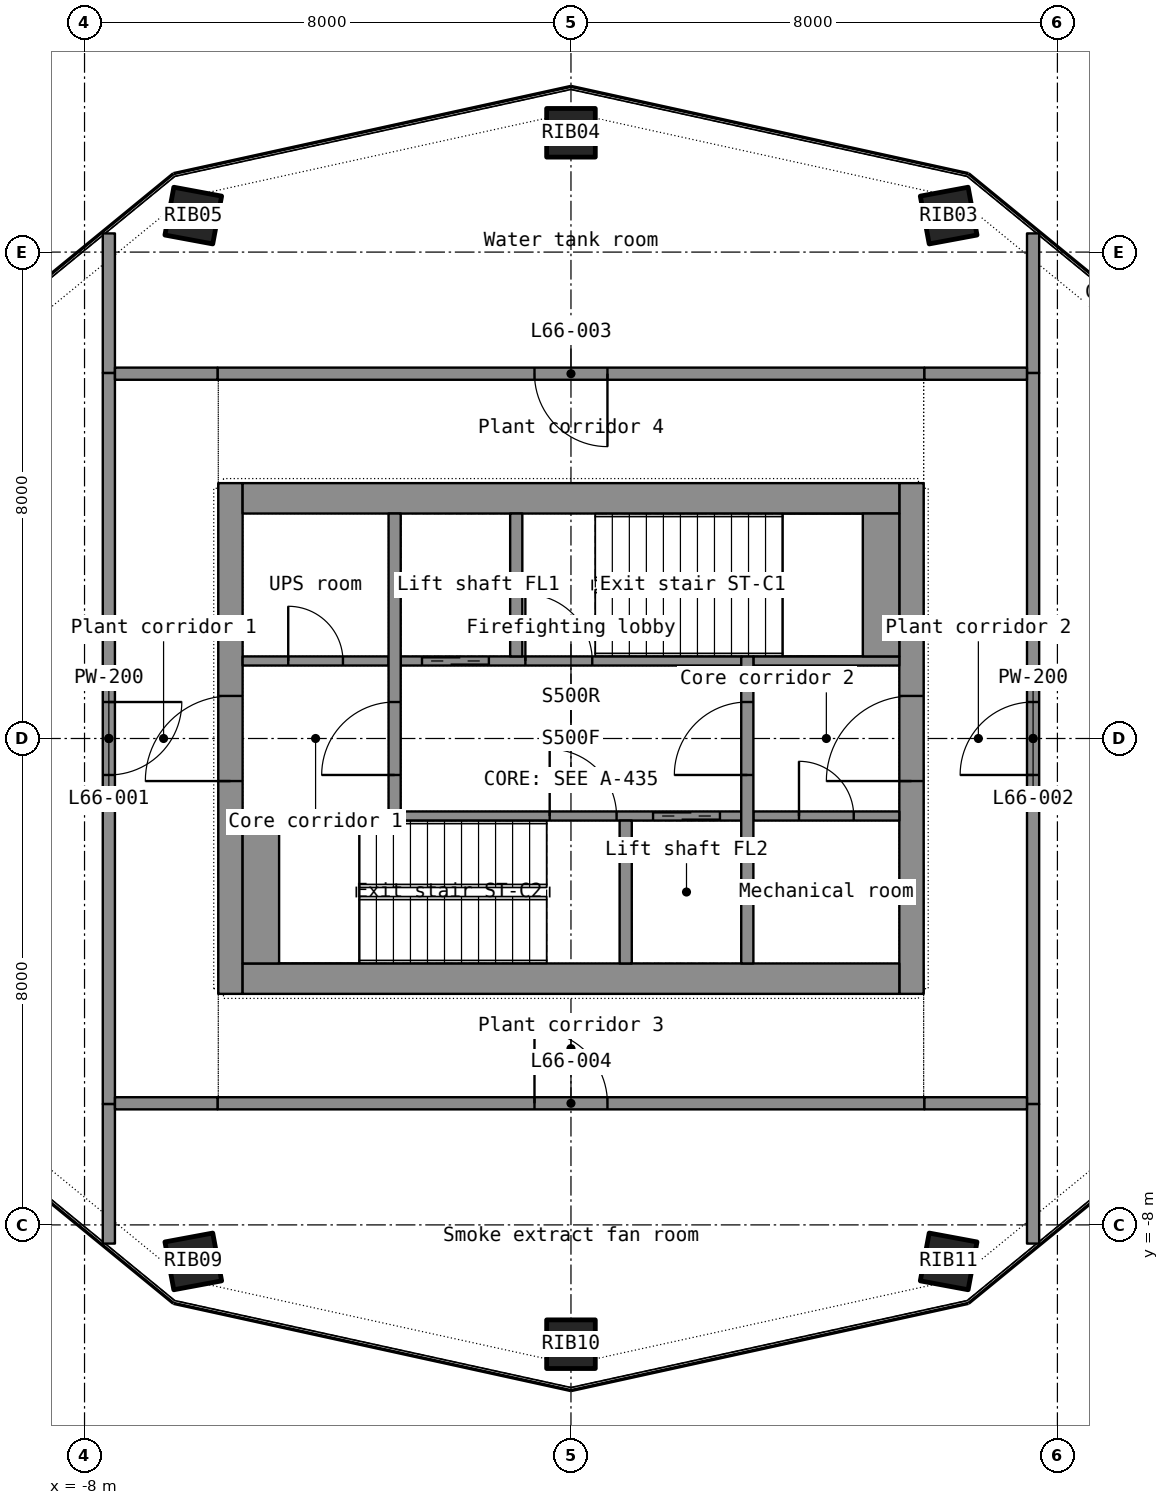
"""IFC4 building model, lengths in metres.
Left out: names, types, materials, properties, quantities, classifications, styles, units other than length and angle.
Written with IfcOpenShell. Run it as: python <this file> out.ifc"""

import sys

from ifc_helpers import new_model, si_unit, direction, frame, frame_2d, origin, origin_2d, place, context, subcontext, project, spatial, rectangle, hollow_rectangle, extrude, element, fill, save


model = new_model("IFC4")
c1 = context("Model", 3, precision=1e-05, world=origin(), true_north=direction((0.0, 1.0)))
c2 = subcontext(c1, "Body", "Model", "MODEL_VIEW")
j1 = project(units=[si_unit("LENGTHUNIT", "METRE"), si_unit("PLANEANGLEUNIT", "RADIAN")], contexts=[c1])
p1 = place(None, origin())
s1 = spatial("IfcSite", under=j1, at=p1, CompositionType="ELEMENT")
p2 = place(p1, origin())
s2 = spatial("IfcBuilding", under=s1, at=p2, CompositionType="ELEMENT")
p3 = place(p2, frame((0.0, 0.0, 272.6)))
s3 = spatial("IfcBuildingStorey", under=s2, at=p3, CompositionType="ELEMENT", Elevation=272.6)
p4 = place(p3, frame((6.211, 8.601, 0.0), z_axis=(-0.06918715, -0.095854973, 0.992987896), x_axis=(0.903382147, -0.428292118, 0.021599968)))
e1 = element("IfcColumn", 1, at=p4, inside=s3, PredefinedType="COLUMN", context=c2, shape_type="SweptSolid", body=[
    extrude(hollow_rectangle(XDim=0.8, YDim=0.8, WallThickness=0.025, at=origin_2d()), origin(), (0.0, 0.0, 1.0), 3.927),
])
p5 = place(p3, frame((0.0, 9.962, 0.0), z_axis=(0.0, -0.111052891, 0.993814497), x_axis=(1.0, 0.0, 0.0)))
e2 = element("IfcColumn", 2, at=p5, inside=s3, PredefinedType="COLUMN", context=c2, shape_type="SweptSolid", body=[
    extrude(hollow_rectangle(XDim=0.8, YDim=0.8, WallThickness=0.025, at=origin_2d()), origin(), (0.0, 0.0, 1.0), 3.924),
])
for number, where, z_axis, x_axis in (
    (3, (-6.211, 8.601, 0.0), (0.069, -0.096, 0.993), (0.903, 0.428, -0.022)),
    (4, (-6.211, -8.601, 0.0), (0.069, 0.096, 0.993), (-0.903, 0.428, 0.022)),
):
    element("IfcColumn", number, at=place(p3, frame(where, z_axis=z_axis, x_axis=x_axis)), inside=s3, PredefinedType="COLUMN", context=c2, shape_type="SweptSolid", body=[
        extrude(hollow_rectangle(XDim=0.8, YDim=0.8, WallThickness=0.025, at=origin_2d()), origin(), (0.0, 0.0, 1.0), 3.927),
    ])
p6 = place(p3, frame((0.0, -9.962, 0.0), z_axis=(0.0, 0.111052891, 0.993814497), x_axis=(-1.0, 0.0, 0.0)))
e5 = element("IfcColumn", 5, at=p6, inside=s3, PredefinedType="COLUMN", context=c2, shape_type="SweptSolid", body=[
    extrude(hollow_rectangle(XDim=0.8, YDim=0.8, WallThickness=0.025, at=origin_2d()), origin(), (0.0, 0.0, 1.0), 3.924),
])
p7 = place(p3, frame((6.211, -8.601, 0.0), z_axis=(-0.06918715, 0.095854973, 0.992987896), x_axis=(-0.903382147, -0.428292118, -0.021599968)))
e6 = element("IfcColumn", 6, at=p7, inside=s3, PredefinedType="COLUMN", context=c2, shape_type="SweptSolid", body=[
    extrude(hollow_rectangle(XDim=0.8, YDim=0.8, WallThickness=0.025, at=origin_2d()), origin(), (0.0, 0.0, 1.0), 3.927),
])
p8 = place(p3, frame((-5.6, -4.2, 0.0), z_axis=(0.0, 0.0, 1.0), x_axis=(0.0, 1.0, 0.0)))
e7 = element("IfcWall", 7, at=p8, inside=s3, PredefinedType="SHEAR", context=c2, shape_type="SweptSolid", body=[
    extrude(rectangle(XDim=8.4, YDim=0.4, at=frame_2d((4.2, 0.0))), origin(), (0.0, 0.0, 1.0), 3.5),
])
p9 = place(p8, frame((3.5, 0.0, 0.0)))
e8 = element("IfcOpeningElement", 8, at=p9, cuts=e7, PredefinedType="OPENING", context=c2, shape_type="SweptSolid", body=[
    extrude(rectangle(XDim=1.4, YDim=2.2, at=frame_2d((0.7, 1.1))), frame((0.0, 0.21, 0.0), z_axis=(0.0, -1.0, 0.0), x_axis=(1.0, 0.0, 0.0)), (0.0, 0.0, 1.0), 0.42),
])
p10 = place(p3, frame((5.6, -4.2, 0.0), z_axis=(0.0, 0.0, 1.0), x_axis=(0.0, 1.0, 0.0)))
e9 = element("IfcWall", 9, at=p10, inside=s3, PredefinedType="SHEAR", context=c2, shape_type="SweptSolid", body=[
    extrude(rectangle(XDim=8.4, YDim=0.4, at=frame_2d((4.2, 0.0))), origin(), (0.0, 0.0, 1.0), 3.5),
])
p11 = place(p10, frame((3.5, 0.0, 0.0)))
e10 = element("IfcOpeningElement", 10, at=p11, cuts=e9, PredefinedType="OPENING", context=c2, shape_type="SweptSolid", body=[
    extrude(rectangle(XDim=1.4, YDim=2.2, at=frame_2d((0.7, 1.1))), frame((0.0, 0.21, 0.0), z_axis=(0.0, -1.0, 0.0), x_axis=(1.0, 0.0, 0.0)), (0.0, 0.0, 1.0), 0.42),
])
for number, where, z_axis, x_axis in (
    (11, (-5.4, -3.95, 0.0), (0.0, 0.0, 1.0), (1.0, 0.0, 0.0)),
    (12, (-5.4, 3.95, 0.0), (0.0, 0.0, 1.0), (1.0, 0.0, 0.0)),
):
    element("IfcWall", number, at=place(p3, frame(where, z_axis=z_axis, x_axis=x_axis)), inside=s3, PredefinedType="SHEAR", context=c2, shape_type="SweptSolid", body=[
        extrude(rectangle(XDim=10.8, YDim=0.5, at=frame_2d((5.4, 0.0))), origin(), (0.0, 0.0, 1.0), 3.5),
    ])
p12 = place(p3, frame((-5.4, -1.275, 0.0), z_axis=(0.0, 0.0, 1.0), x_axis=(1.0, 0.0, 0.0)))
e13 = element("IfcWall", 13, at=p12, inside=s3, PredefinedType="SHEAR", context=c2, shape_type="SweptSolid", body=[
    extrude(rectangle(XDim=2.4, YDim=0.15, at=frame_2d((1.2, 0.0))), origin(), (0.0, 0.0, 1.0), 3.5),
])
p13 = place(p3, frame((-2.8, -1.275, 0.0), z_axis=(0.0, 0.0, 1.0), x_axis=(1.0, 0.0, 0.0)))
e14 = element("IfcWall", 14, at=p13, inside=s3, PredefinedType="SHEAR", context=c2, shape_type="SweptSolid", body=[
    extrude(rectangle(XDim=5.6, YDim=0.15, at=frame_2d((2.8, 0.0))), origin(), (0.0, 0.0, 1.0), 3.5),
])
p14 = place(p13, frame((4.15, 0.0, 0.0)))
e15 = element("IfcOpeningElement", 15, at=p14, cuts=e14, PredefinedType="OPENING", context=c2, shape_type="SweptSolid", body=[
    extrude(rectangle(XDim=1.1, YDim=2.2, at=frame_2d((0.55, 1.1))), frame((0.0, 0.085, 0.0), z_axis=(0.0, -1.0, 0.0), x_axis=(1.0, 0.0, 0.0)), (0.0, 0.0, 1.0), 0.17),
])
p15 = place(p13, frame((2.45, 0.0, 0.0)))
e16 = element("IfcOpeningElement", 16, at=p15, cuts=e14, PredefinedType="OPENING", context=c2, shape_type="SweptSolid", body=[
    extrude(rectangle(XDim=1.1, YDim=2.15, at=frame_2d((0.55, 1.075))), frame((0.0, 0.085, 0.0), z_axis=(0.0, -1.0, 0.0), x_axis=(1.0, 0.0, 0.0)), (0.0, 0.0, 1.0), 0.17),
])
p16 = place(p3, frame((3.0, -1.275, 0.0), z_axis=(0.0, 0.0, 1.0), x_axis=(1.0, 0.0, 0.0)))
e17 = element("IfcWall", 17, at=p16, inside=s3, PredefinedType="PARTITIONING", context=c2, shape_type="SweptSolid", body=[
    extrude(rectangle(XDim=2.4, YDim=0.15, at=frame_2d((1.2, 0.0))), origin(), (0.0, 0.0, 1.0), 3.5),
])
p17 = place(p16, frame((0.75, 0.0, 0.0)))
e18 = element("IfcOpeningElement", 18, at=p17, cuts=e17, PredefinedType="OPENING", context=c2, shape_type="SweptSolid", body=[
    extrude(rectangle(XDim=0.9, YDim=2.1, at=frame_2d((0.45, 1.05))), frame((0.0, 0.085, 0.0), z_axis=(0.0, -1.0, 0.0), x_axis=(1.0, 0.0, 0.0)), (0.0, 0.0, 1.0), 0.17),
])
p18 = place(p3, frame((-5.4, 1.275, 0.0), z_axis=(0.0, 0.0, 1.0), x_axis=(1.0, 0.0, 0.0)))
e19 = element("IfcWall", 19, at=p18, inside=s3, PredefinedType="PARTITIONING", context=c2, shape_type="SweptSolid", body=[
    extrude(rectangle(XDim=2.4, YDim=0.15, at=frame_2d((1.2, 0.0))), origin(), (0.0, 0.0, 1.0), 3.5),
])
p19 = place(p18, frame((0.75, 0.0, 0.0)))
e20 = element("IfcOpeningElement", 20, at=p19, cuts=e19, PredefinedType="OPENING", context=c2, shape_type="SweptSolid", body=[
    extrude(rectangle(XDim=0.9, YDim=2.1, at=frame_2d((0.45, 1.05))), frame((0.0, 0.085, 0.0), z_axis=(0.0, -1.0, 0.0), x_axis=(1.0, 0.0, 0.0)), (0.0, 0.0, 1.0), 0.17),
])
p20 = place(p3, frame((-2.8, 1.275, 0.0), z_axis=(0.0, 0.0, 1.0), x_axis=(1.0, 0.0, 0.0)))
e21 = element("IfcWall", 21, at=p20, inside=s3, PredefinedType="SHEAR", context=c2, shape_type="SweptSolid", body=[
    extrude(rectangle(XDim=5.6, YDim=0.15, at=frame_2d((2.8, 0.0))), origin(), (0.0, 0.0, 1.0), 3.5),
])
p21 = place(p20, frame((0.35, 0.0, 0.0)))
e22 = element("IfcOpeningElement", 22, at=p21, cuts=e21, PredefinedType="OPENING", context=c2, shape_type="SweptSolid", body=[
    extrude(rectangle(XDim=1.1, YDim=2.2, at=frame_2d((0.55, 1.1))), frame((0.0, 0.085, 0.0), z_axis=(0.0, -1.0, 0.0), x_axis=(1.0, 0.0, 0.0)), (0.0, 0.0, 1.0), 0.17),
])
p22 = place(p20, frame((2.05, 0.0, 0.0)))
e23 = element("IfcOpeningElement", 23, at=p22, cuts=e21, PredefinedType="OPENING", context=c2, shape_type="SweptSolid", body=[
    extrude(rectangle(XDim=1.1, YDim=2.15, at=frame_2d((0.55, 1.075))), frame((0.0, 0.085, 0.0), z_axis=(0.0, -1.0, 0.0), x_axis=(1.0, 0.0, 0.0)), (0.0, 0.0, 1.0), 0.17),
])
p23 = place(p3, frame((3.0, 1.275, 0.0), z_axis=(0.0, 0.0, 1.0), x_axis=(1.0, 0.0, 0.0)))
e24 = element("IfcWall", 24, at=p23, inside=s3, PredefinedType="SHEAR", context=c2, shape_type="SweptSolid", body=[
    extrude(rectangle(XDim=2.4, YDim=0.15, at=frame_2d((1.2, 0.0))), origin(), (0.0, 0.0, 1.0), 3.5),
])
p24 = place(p3, frame((-2.9, -1.35, 0.0), z_axis=(0.0, 0.0, 1.0), x_axis=(0.0, 1.0, 0.0)))
e25 = element("IfcWall", 25, at=p24, inside=s3, PredefinedType="SHEAR", context=c2, shape_type="SweptSolid", body=[
    extrude(rectangle(XDim=5.05, YDim=0.2, at=frame_2d((2.525, 0.0))), origin(), (0.0, 0.0, 1.0), 3.5),
])
p25 = place(p24, frame((0.75, 0.0, 0.0)))
e26 = element("IfcOpeningElement", 26, at=p25, cuts=e25, PredefinedType="OPENING", context=c2, shape_type="SweptSolid", body=[
    extrude(rectangle(XDim=1.2, YDim=2.2, at=frame_2d((0.6, 1.1))), frame((0.0, 0.11, 0.0), z_axis=(0.0, -1.0, 0.0), x_axis=(1.0, 0.0, 0.0)), (0.0, 0.0, 1.0), 0.22),
])
p26 = place(p3, frame((2.9, -3.7, 0.0), z_axis=(0.0, 0.0, 1.0), x_axis=(0.0, 1.0, 0.0)))
e27 = element("IfcWall", 27, at=p26, inside=s3, PredefinedType="SHEAR", context=c2, shape_type="SweptSolid", body=[
    extrude(rectangle(XDim=5.05, YDim=0.2, at=frame_2d((2.525, 0.0))), origin(), (0.0, 0.0, 1.0), 3.5),
])
p27 = place(p26, frame((3.1, 0.0, 0.0)))
e28 = element("IfcOpeningElement", 28, at=p27, cuts=e27, PredefinedType="OPENING", context=c2, shape_type="SweptSolid", body=[
    extrude(rectangle(XDim=1.2, YDim=2.2, at=frame_2d((0.6, 1.1))), frame((0.0, 0.11, 0.0), z_axis=(0.0, -1.0, 0.0), x_axis=(1.0, 0.0, 0.0)), (0.0, 0.0, 1.0), 0.22),
])
for number, where, z_axis, x_axis in (
    (29, (-0.9, 1.35, 0.0), (0.0, 0.0, 1.0), (0.0, 1.0, 0.0)),
    (30, (0.9, -3.7, 0.0), (0.0, 0.0, 1.0), (0.0, 1.0, 0.0)),
):
    element("IfcWall", number, at=place(p3, frame(where, z_axis=z_axis, x_axis=x_axis)), inside=s3, PredefinedType="SHEAR", context=c2, shape_type="SweptSolid", body=[
        extrude(rectangle(XDim=2.35, YDim=0.2, at=frame_2d((1.175, 0.0))), origin(), (0.0, 0.0, 1.0), 3.5),
    ])
for number, where, z_axis, x_axis in (
    (31, (5.1, 1.35, 0.0), (0.0, 0.0, 1.0), (0.0, 1.0, 0.0)),
    (32, (-5.1, -3.7, 0.0), (0.0, 0.0, 1.0), (0.0, 1.0, 0.0)),
):
    element("IfcWall", number, at=place(p3, frame(where, z_axis=z_axis, x_axis=x_axis)), inside=s3, PredefinedType="SHEAR", context=c2, shape_type="SweptSolid", body=[
        extrude(rectangle(XDim=2.35, YDim=0.6, at=frame_2d((1.175, 0.0))), origin(), (0.0, 0.0, 1.0), 3.5),
    ])
p28 = place(p3, frame((-7.6, 6.012, 0.0), z_axis=(0.0, 0.0, 1.0), x_axis=(0.0, -1.0, 0.0)))
e33 = element("IfcWall", 33, at=p28, inside=s3, PredefinedType="PARTITIONING", context=c2, shape_type="SweptSolid", body=[
    extrude(rectangle(XDim=12.024, YDim=0.2, at=frame_2d((6.012, 0.0))), origin(), (0.0, 0.0, 1.0), 2.9),
])
p29 = place(p28, frame((5.412, 0.0, 0.0)))
e34 = element("IfcOpeningElement", 34, at=p29, cuts=e33, PredefinedType="OPENING", context=c2, shape_type="SweptSolid", body=[
    extrude(rectangle(XDim=1.2, YDim=2.2, at=frame_2d((0.6, 1.1))), frame((0.0, 0.11, 0.0), z_axis=(0.0, -1.0, 0.0), x_axis=(1.0, 0.0, 0.0)), (0.0, 0.0, 1.0), 0.22),
])
p30 = place(p3, frame((7.6, -6.012, 0.0), z_axis=(0.0, 0.0, 1.0), x_axis=(0.0, 1.0, 0.0)))
e35 = element("IfcWall", 35, at=p30, inside=s3, PredefinedType="PARTITIONING", context=c2, shape_type="SweptSolid", body=[
    extrude(rectangle(XDim=12.024, YDim=0.2, at=frame_2d((6.012, 0.0))), origin(), (0.0, 0.0, 1.0), 2.9),
])
p31 = place(p30, frame((5.412, 0.0, 0.0)))
e36 = element("IfcOpeningElement", 36, at=p31, cuts=e35, PredefinedType="OPENING", context=c2, shape_type="SweptSolid", body=[
    extrude(rectangle(XDim=1.2, YDim=2.2, at=frame_2d((0.6, 1.1))), frame((0.0, 0.11, 0.0), z_axis=(0.0, -1.0, 0.0), x_axis=(1.0, 0.0, 0.0)), (0.0, 0.0, 1.0), 0.22),
])
p32 = place(p3, frame((-5.812, -6.0, 0.0), z_axis=(0.0, 0.0, 1.0), x_axis=(1.0, 0.0, 0.0)))
e37 = element("IfcWall", 37, at=p32, inside=s3, PredefinedType="PARTITIONING", context=c2, shape_type="SweptSolid", body=[
    extrude(rectangle(XDim=11.624, YDim=0.2, at=frame_2d((5.812, 0.0))), origin(), (0.0, 0.0, 1.0), 2.9),
])
p33 = place(p32, frame((5.212, 0.0, 0.0)))
e38 = element("IfcOpeningElement", 38, at=p33, cuts=e37, PredefinedType="OPENING", context=c2, shape_type="SweptSolid", body=[
    extrude(rectangle(XDim=1.2, YDim=2.2, at=frame_2d((0.6, 1.1))), frame((0.0, 0.11, 0.0), z_axis=(0.0, -1.0, 0.0), x_axis=(1.0, 0.0, 0.0)), (0.0, 0.0, 1.0), 0.22),
])
p34 = place(p3, frame((5.812, 6.0, 0.0), z_axis=(0.0, 0.0, 1.0), x_axis=(-1.0, 0.0, 0.0)))
e39 = element("IfcWall", 39, at=p34, inside=s3, PredefinedType="PARTITIONING", context=c2, shape_type="SweptSolid", body=[
    extrude(rectangle(XDim=11.624, YDim=0.2, at=frame_2d((5.812, 0.0))), origin(), (0.0, 0.0, 1.0), 2.9),
])
p35 = place(p34, frame((5.212, 0.0, 0.0)))
e40 = element("IfcOpeningElement", 40, at=p35, cuts=e39, PredefinedType="OPENING", context=c2, shape_type="SweptSolid", body=[
    extrude(rectangle(XDim=1.2, YDim=2.2, at=frame_2d((0.6, 1.1))), frame((0.0, 0.11, 0.0), z_axis=(0.0, -1.0, 0.0), x_axis=(1.0, 0.0, 0.0)), (0.0, 0.0, 1.0), 0.22),
])
for number, where, z_axis, x_axis in (
    (41, (-7.6, -8.307, 0.0), (0.0, 0.0, 1.0), (0.0, 1.0, 0.0)),
    (42, (-7.6, 6.013, 0.0), (0.0, 0.0, 1.0), (0.0, 1.0, 0.0)),
    (43, (7.6, -6.013, 0.0), (0.0, 0.0, 1.0), (0.0, -1.0, 0.0)),
    (44, (7.6, 8.307, 0.0), (0.0, 0.0, 1.0), (0.0, -1.0, 0.0)),
):
    element("IfcWall", number, at=place(p3, frame(where, z_axis=z_axis, x_axis=x_axis)), inside=s3, PredefinedType="PARTITIONING", context=c2, shape_type="SweptSolid", body=[
        extrude(rectangle(XDim=2.294, YDim=0.2, at=frame_2d((1.147, 0.0))), origin(), (0.0, 0.0, 1.0), 2.9),
    ])
for number, where, z_axis, x_axis in (
    (45, (-7.499, -6.0, 0.0), (0.0, 0.0, 1.0), (1.0, 0.0, 0.0)),
    (46, (-5.813, 6.0, 0.0), (0.0, 0.0, 1.0), (-1.0, 0.0, 0.0)),
    (47, (5.813, -6.0, 0.0), (0.0, 0.0, 1.0), (1.0, 0.0, 0.0)),
    (48, (7.499, 6.0, 0.0), (0.0, 0.0, 1.0), (-1.0, 0.0, 0.0)),
):
    element("IfcWall", number, at=place(p3, frame(where, z_axis=z_axis, x_axis=x_axis)), inside=s3, PredefinedType="PARTITIONING", context=c2, shape_type="SweptSolid", body=[
        extrude(rectangle(XDim=1.686, YDim=0.2, at=frame_2d((0.843, 0.0))), origin(), (0.0, 0.0, 1.0), 2.9),
    ])
p36 = place(p9, origin())
e49 = element("IfcDoor", 49, at=p36, inside=s3, OperationType="DOUBLE_DOOR_SINGLE_SWING", PredefinedType="DOOR", context=c2, shape_type="SweptSolid", body=[
    extrude(rectangle(XDim=1.4, YDim=2.2, at=frame_2d((0.7, 1.1))), frame((0.0, 0.025, 0.0), z_axis=(0.0, -1.0, 0.0), x_axis=(1.0, 0.0, 0.0)), (0.0, 0.0, 1.0), 0.05),
])
fill(e8, e49)
p37 = place(p11, origin())
e50 = element("IfcDoor", 50, at=p37, inside=s3, OperationType="DOUBLE_DOOR_SINGLE_SWING", PredefinedType="DOOR", context=c2, shape_type="SweptSolid", body=[
    extrude(rectangle(XDim=1.4, YDim=2.2, at=frame_2d((0.7, 1.1))), frame((0.0, 0.025, 0.0), z_axis=(0.0, -1.0, 0.0), x_axis=(1.0, 0.0, 0.0)), (0.0, 0.0, 1.0), 0.05),
])
fill(e10, e50)
p38 = place(p25, origin())
e51 = element("IfcDoor", 51, at=p38, inside=s3, OperationType="SINGLE_SWING_LEFT", PredefinedType="DOOR", context=c2, shape_type="SweptSolid", body=[
    extrude(rectangle(XDim=1.2, YDim=2.2, at=frame_2d((0.6, 1.1))), frame((0.0, 0.025, 0.0), z_axis=(0.0, -1.0, 0.0), x_axis=(1.0, 0.0, 0.0)), (0.0, 0.0, 1.0), 0.05),
])
fill(e26, e51)
p39 = place(p27, origin())
e52 = element("IfcDoor", 52, at=p39, inside=s3, OperationType="SINGLE_SWING_LEFT", PredefinedType="DOOR", context=c2, shape_type="SweptSolid", body=[
    extrude(rectangle(XDim=1.2, YDim=2.2, at=frame_2d((0.6, 1.1))), frame((0.0, 0.025, 0.0), z_axis=(0.0, -1.0, 0.0), x_axis=(1.0, 0.0, 0.0)), (0.0, 0.0, 1.0), 0.05),
])
fill(e28, e52)
p40 = place(p21, origin())
e53 = element("IfcDoor", 53, at=p40, inside=s3, OperationType="DOUBLE_DOOR_SLIDING", PredefinedType="DOOR", context=c2, shape_type="SweptSolid", body=[
    extrude(rectangle(XDim=1.1, YDim=2.2, at=frame_2d((0.55, 1.1))), frame((0.0, 0.025, 0.0), z_axis=(0.0, -1.0, 0.0), x_axis=(1.0, 0.0, 0.0)), (0.0, 0.0, 1.0), 0.05),
])
fill(e22, e53)
p41 = place(p14, origin())
e54 = element("IfcDoor", 54, at=p41, inside=s3, OperationType="DOUBLE_DOOR_SLIDING", PredefinedType="DOOR", context=c2, shape_type="SweptSolid", body=[
    extrude(rectangle(XDim=1.1, YDim=2.2, at=frame_2d((0.55, 1.1))), frame((0.0, 0.025, 0.0), z_axis=(0.0, -1.0, 0.0), x_axis=(1.0, 0.0, 0.0)), (0.0, 0.0, 1.0), 0.05),
])
fill(e15, e54)
p42 = place(p22, origin())
e55 = element("IfcDoor", 55, at=p42, inside=s3, OperationType="SINGLE_SWING_LEFT", PredefinedType="DOOR", context=c2, shape_type="SweptSolid", body=[
    extrude(rectangle(XDim=1.1, YDim=2.15, at=frame_2d((0.55, 1.075))), frame((0.0, 0.025, 0.0), z_axis=(0.0, -1.0, 0.0), x_axis=(1.0, 0.0, 0.0)), (0.0, 0.0, 1.0), 0.05),
])
fill(e23, e55)
p43 = place(p15, origin())
e56 = element("IfcDoor", 56, at=p43, inside=s3, OperationType="SINGLE_SWING_LEFT", PredefinedType="DOOR", context=c2, shape_type="SweptSolid", body=[
    extrude(rectangle(XDim=1.1, YDim=2.15, at=frame_2d((0.55, 1.075))), frame((0.0, 0.025, 0.0), z_axis=(0.0, -1.0, 0.0), x_axis=(1.0, 0.0, 0.0)), (0.0, 0.0, 1.0), 0.05),
])
fill(e16, e56)
p44 = place(p19, origin())
e57 = element("IfcDoor", 57, at=p44, inside=s3, OperationType="SINGLE_SWING_LEFT", PredefinedType="DOOR", context=c2, shape_type="SweptSolid", body=[
    extrude(rectangle(XDim=0.9, YDim=2.1, at=frame_2d((0.45, 1.05))), frame((0.0, 0.025, 0.0), z_axis=(0.0, -1.0, 0.0), x_axis=(1.0, 0.0, 0.0)), (0.0, 0.0, 1.0), 0.05),
])
fill(e20, e57)
p45 = place(p17, origin())
e58 = element("IfcDoor", 58, at=p45, inside=s3, OperationType="SINGLE_SWING_LEFT", PredefinedType="DOOR", context=c2, shape_type="SweptSolid", body=[
    extrude(rectangle(XDim=0.9, YDim=2.1, at=frame_2d((0.45, 1.05))), frame((0.0, 0.025, 0.0), z_axis=(0.0, -1.0, 0.0), x_axis=(1.0, 0.0, 0.0)), (0.0, 0.0, 1.0), 0.05),
])
fill(e18, e58)
p46 = place(p29, origin())
e59 = element("IfcDoor", 59, at=p46, inside=s3, OperationType="DOUBLE_DOOR_SINGLE_SWING", PredefinedType="DOOR", context=c2, shape_type="SweptSolid", body=[
    extrude(rectangle(XDim=1.2, YDim=2.2, at=frame_2d((0.6, 1.1))), frame((0.0, 0.025, 0.0), z_axis=(0.0, -1.0, 0.0), x_axis=(1.0, 0.0, 0.0)), (0.0, 0.0, 1.0), 0.05),
])
fill(e34, e59)
p47 = place(p31, origin())
e60 = element("IfcDoor", 60, at=p47, inside=s3, OperationType="DOUBLE_DOOR_SINGLE_SWING", PredefinedType="DOOR", context=c2, shape_type="SweptSolid", body=[
    extrude(rectangle(XDim=1.2, YDim=2.2, at=frame_2d((0.6, 1.1))), frame((0.0, 0.025, 0.0), z_axis=(0.0, -1.0, 0.0), x_axis=(1.0, 0.0, 0.0)), (0.0, 0.0, 1.0), 0.05),
])
fill(e36, e60)
p48 = place(p35, origin())
e61 = element("IfcDoor", 61, at=p48, inside=s3, OperationType="DOUBLE_DOOR_SINGLE_SWING", PredefinedType="DOOR", context=c2, shape_type="SweptSolid", body=[
    extrude(rectangle(XDim=1.2, YDim=2.2, at=frame_2d((0.6, 1.1))), frame((0.0, 0.025, 0.0), z_axis=(0.0, -1.0, 0.0), x_axis=(1.0, 0.0, 0.0)), (0.0, 0.0, 1.0), 0.05),
])
fill(e40, e61)
p49 = place(p33, origin())
e62 = element("IfcDoor", 62, at=p49, inside=s3, OperationType="DOUBLE_DOOR_SINGLE_SWING", PredefinedType="DOOR", context=c2, shape_type="SweptSolid", body=[
    extrude(rectangle(XDim=1.2, YDim=2.2, at=frame_2d((0.6, 1.1))), frame((0.0, 0.025, 0.0), z_axis=(0.0, -1.0, 0.0), x_axis=(1.0, 0.0, 0.0)), (0.0, 0.0, 1.0), 0.05),
])
fill(e38, e62)
save(model, sys.argv[1])
